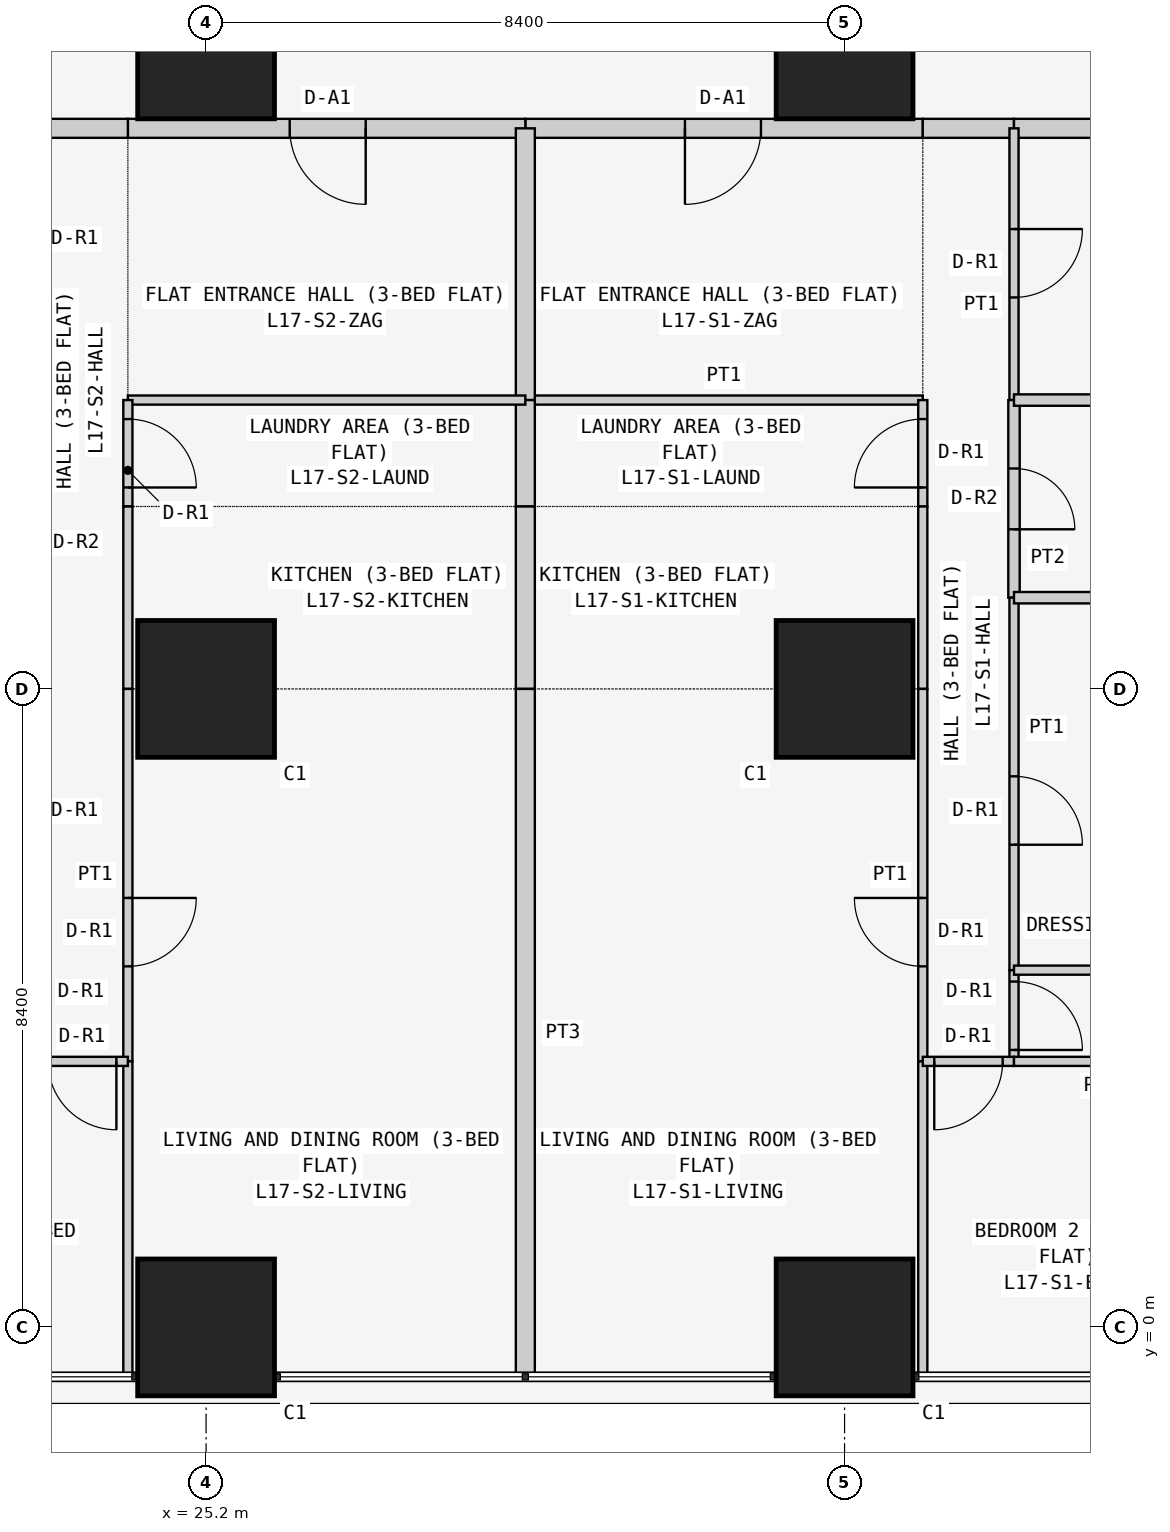
"""IFC4 building model, lengths in metres.
Left out: names, types, materials, properties, quantities, classifications, styles, units other than length and angle.
Written with IfcOpenShell. Run it as: python <this file> out.ifc"""

import sys

from ifc_helpers import new_model, si_unit, direction, frame, frame_2d, origin, origin_2d, place, context, subcontext, project, spatial, rectangle, extrude, element, fill, save


model = new_model("IFC4")
c1 = context("Model", 3, precision=1e-05, world=origin(), true_north=direction((0.0, 1.0)))
c2 = subcontext(c1, "Body", "Model", "MODEL_VIEW")
j1 = project(units=[si_unit("LENGTHUNIT", "METRE"), si_unit("PLANEANGLEUNIT", "RADIAN")], contexts=[c1])
p1 = place(None, origin())
s1 = spatial("IfcSite", under=j1, at=p1, CompositionType="ELEMENT")
p2 = place(p1, origin())
s2 = spatial("IfcBuilding", under=s1, at=p2, CompositionType="ELEMENT")
p3 = place(p2, frame((0.0, 0.0, 70.5)))
s3 = spatial("IfcBuildingStorey", under=s2, at=p3, CompositionType="ELEMENT", Elevation=70.5)
for number, where, z_axis, x_axis in (
    (1, (25.2, 0.0, 0.0), (0.0, 0.0, 1.0), (1.0, 0.0, 0.0)),
    (2, (25.2, 8.4, 0.0), (0.0, 0.0, 1.0), (1.0, 0.0, 0.0)),
    (3, (25.2, 16.8, 0.0), (0.0, 0.0, 1.0), (1.0, 0.0, 0.0)),
    (4, (33.6, 0.0, 0.0), (0.0, 0.0, 1.0), (1.0, 0.0, 0.0)),
    (5, (33.6, 8.4, 0.0), (0.0, 0.0, 1.0), (1.0, 0.0, 0.0)),
    (6, (33.6, 16.8, 0.0), (0.0, 0.0, 1.0), (1.0, 0.0, 0.0)),
):
    element("IfcColumn", number, at=place(p3, frame(where, z_axis=z_axis, x_axis=x_axis)), inside=s3, PredefinedType="COLUMN", context=c2, shape_type="SweptSolid", body=[
        extrude(rectangle(XDim=1.8, YDim=1.8, at=origin_2d()), origin(), (0.0, 0.0, 1.0), 3.6),
    ])
p4 = place(p3, frame((34.629, 15.775, 0.0), z_axis=(0.0, 0.0, 1.0), x_axis=(-1.0, 0.0, 0.0)))
e7 = element("IfcWall", 7, at=p4, inside=s3, PredefinedType="PARTITIONING", context=c2, shape_type="SweptSolid", body=[
    extrude(rectangle(XDim=5.229, YDim=0.25, at=frame_2d((2.615, 0.0))), origin(), (0.0, 0.0, 1.0), 3.45),
])
p5 = place(p4, frame((2.129, 0.0, 0.0)))
e8 = element("IfcOpeningElement", 8, at=p5, cuts=e7, PredefinedType="OPENING", context=c2, shape_type="SweptSolid", body=[
    extrude(rectangle(XDim=1.0, YDim=2.1, at=frame_2d((0.5, 1.05))), frame((0.0, 0.135, 0.0), z_axis=(0.0, -1.0, 0.0), x_axis=(1.0, 0.0, 0.0)), (0.0, 0.0, 1.0), 0.27),
])
p6 = place(p3, frame((35.829, 15.775, 0.0), z_axis=(0.0, 0.0, 1.0), x_axis=(-1.0, 0.0, 0.0)))
e9 = element("IfcWall", 9, at=p6, inside=s3, PredefinedType="PARTITIONING", context=c2, shape_type="SweptSolid", body=[
    extrude(rectangle(XDim=1.2, YDim=0.25, at=frame_2d((0.6, 0.0))), origin(), (0.0, 0.0, 1.0), 3.45),
])
p7 = place(p3, frame((42.7, 15.775, 0.0), z_axis=(0.0, 0.0, 1.0), x_axis=(-1.0, 0.0, 0.0)))
e10 = element("IfcWall", 10, at=p7, inside=s3, PredefinedType="PARTITIONING", context=c2, shape_type="SweptSolid", body=[
    extrude(rectangle(XDim=6.871, YDim=0.25, at=frame_2d((3.436, 0.0))), origin(), (0.0, 0.0, 1.0), 3.45),
])
p8 = place(p3, frame((29.4, 15.775, 0.0), z_axis=(0.0, 0.0, 1.0), x_axis=(-1.0, 0.0, 0.0)))
e11 = element("IfcWall", 11, at=p8, inside=s3, PredefinedType="PARTITIONING", context=c2, shape_type="SweptSolid", body=[
    extrude(rectangle(XDim=5.229, YDim=0.25, at=frame_2d((2.615, 0.0))), origin(), (0.0, 0.0, 1.0), 3.45),
])
p9 = place(p8, frame((2.1, 0.0, 0.0)))
e12 = element("IfcOpeningElement", 12, at=p9, cuts=e11, PredefinedType="OPENING", context=c2, shape_type="SweptSolid", body=[
    extrude(rectangle(XDim=1.0, YDim=2.1, at=frame_2d((0.5, 1.05))), frame((0.0, 0.135, 0.0), z_axis=(0.0, -1.0, 0.0), x_axis=(1.0, 0.0, 0.0)), (0.0, 0.0, 1.0), 0.27),
])
p10 = place(p3, frame((24.171, 15.775, 0.0), z_axis=(0.0, 0.0, 1.0), x_axis=(-1.0, 0.0, 0.0)))
e13 = element("IfcWall", 13, at=p10, inside=s3, PredefinedType="PARTITIONING", context=c2, shape_type="SweptSolid", body=[
    extrude(rectangle(XDim=1.2, YDim=0.25, at=frame_2d((0.6, 0.0))), origin(), (0.0, 0.0, 1.0), 3.45),
])
p11 = place(p3, frame((29.4, 12.2, 0.0), z_axis=(0.0, 0.0, 1.0), x_axis=(1.0, 0.0, 0.0)))
e14 = element("IfcWall", 14, at=p11, inside=s3, PredefinedType="PARTITIONING", context=c2, shape_type="SweptSolid", body=[
    extrude(rectangle(XDim=5.229, YDim=0.12, at=frame_2d((2.615, 0.0))), origin(), (0.0, 0.0, 1.0), 3.45),
])
p12 = place(p3, frame((29.4, 15.775, 0.0), z_axis=(0.0, 0.0, 1.0), x_axis=(0.0, -1.0, 0.0)))
e15 = element("IfcWall", 15, at=p12, inside=s3, PredefinedType="PARTITIONING", context=c2, shape_type="SweptSolid", body=[
    extrude(rectangle(XDim=3.575, YDim=0.25, at=frame_2d((1.788, 0.0))), origin(), (0.0, 0.0, 1.0), 2.848),
])
p13 = place(p3, frame((34.629, 10.8, 0.0), z_axis=(0.0, 0.0, 1.0), x_axis=(0.0, 1.0, 0.0)))
e16 = element("IfcWall", 16, at=p13, inside=s3, PredefinedType="PARTITIONING", context=c2, shape_type="SweptSolid", body=[
    extrude(rectangle(XDim=1.4, YDim=0.12, at=frame_2d((0.7, 0.0))), origin(), (0.0, 0.0, 1.0), 3.45),
])
p14 = place(p13, frame((0.25, 0.0, 0.0)))
e17 = element("IfcOpeningElement", 17, at=p14, cuts=e16, PredefinedType="OPENING", context=c2, shape_type="SweptSolid", body=[
    extrude(rectangle(XDim=0.9, YDim=2.1, at=frame_2d((0.45, 1.05))), frame((0.0, 0.07, 0.0), z_axis=(0.0, -1.0, 0.0), x_axis=(1.0, 0.0, 0.0)), (0.0, 0.0, 1.0), 0.14),
])
p15 = place(p3, frame((29.4, 12.2, 0.0), z_axis=(0.0, 0.0, 1.0), x_axis=(0.0, -1.0, 0.0)))
e18 = element("IfcWall", 18, at=p15, inside=s3, PredefinedType="PARTITIONING", context=c2, shape_type="SweptSolid", body=[
    extrude(rectangle(XDim=1.4, YDim=0.25, at=frame_2d((0.7, 0.0))), origin(), (0.0, 0.0, 1.0), 2.848),
])
p16 = place(p3, frame((34.629, 8.4, 0.0), z_axis=(0.0, 0.0, 1.0), x_axis=(0.0, 1.0, 0.0)))
e19 = element("IfcWall", 19, at=p16, inside=s3, PredefinedType="PARTITIONING", context=c2, shape_type="SweptSolid", body=[
    extrude(rectangle(XDim=2.4, YDim=0.12, at=frame_2d((1.2, 0.0))), origin(), (0.0, 0.0, 1.0), 3.45),
])
p17 = place(p3, frame((29.4, 10.8, 0.0), z_axis=(0.0, 0.0, 1.0), x_axis=(0.0, -1.0, 0.0)))
e20 = element("IfcWall", 20, at=p17, inside=s3, PredefinedType="PARTITIONING", context=c2, shape_type="SweptSolid", body=[
    extrude(rectangle(XDim=2.4, YDim=0.25, at=frame_2d((1.2, 0.0))), origin(), (0.0, 0.0, 1.0), 2.848),
])
p18 = place(p3, frame((34.629, 3.5, 0.0), z_axis=(0.0, 0.0, 1.0), x_axis=(0.0, 1.0, 0.0)))
e21 = element("IfcWall", 21, at=p18, inside=s3, PredefinedType="PARTITIONING", context=c2, shape_type="SweptSolid", body=[
    extrude(rectangle(XDim=4.9, YDim=0.12, at=frame_2d((2.45, 0.0))), origin(), (0.0, 0.0, 1.0), 3.45),
])
p19 = place(p18, frame((1.25, 0.0, 0.0)))
e22 = element("IfcOpeningElement", 22, at=p19, cuts=e21, PredefinedType="OPENING", context=c2, shape_type="SweptSolid", body=[
    extrude(rectangle(XDim=0.9, YDim=2.1, at=frame_2d((0.45, 1.05))), frame((0.0, 0.07, 0.0), z_axis=(0.0, -1.0, 0.0), x_axis=(1.0, 0.0, 0.0)), (0.0, 0.0, 1.0), 0.14),
])
p20 = place(p3, frame((34.629, -0.65, 0.0), z_axis=(0.0, 0.0, 1.0), x_axis=(0.0, 1.0, 0.0)))
e23 = element("IfcWall", 23, at=p20, inside=s3, PredefinedType="PARTITIONING", context=c2, shape_type="SweptSolid", body=[
    extrude(rectangle(XDim=4.15, YDim=0.12, at=frame_2d((2.075, 0.0))), origin(), (0.0, 0.0, 1.0), 3.45),
])
p21 = place(p3, frame((29.4, 8.4, 0.0), z_axis=(0.0, 0.0, 1.0), x_axis=(0.0, -1.0, 0.0)))
e24 = element("IfcWall", 24, at=p21, inside=s3, PredefinedType="PARTITIONING", context=c2, shape_type="SweptSolid", body=[
    extrude(rectangle(XDim=9.05, YDim=0.25, at=frame_2d((4.525, 0.0))), origin(), (0.0, 0.0, 1.0), 2.848),
])
p22 = place(p3, frame((35.829, 12.2, 0.0), z_axis=(0.0, 0.0, 1.0), x_axis=(0.0, 1.0, 0.0)))
e25 = element("IfcWall", 25, at=p22, inside=s3, PredefinedType="PARTITIONING", context=c2, shape_type="SweptSolid", body=[
    extrude(rectangle(XDim=3.575, YDim=0.12, at=frame_2d((1.788, 0.0))), origin(), (0.0, 0.0, 1.0), 3.45),
])
p23 = place(p22, frame((1.35, 0.0, 0.0)))
e26 = element("IfcOpeningElement", 26, at=p23, cuts=e25, PredefinedType="OPENING", context=c2, shape_type="SweptSolid", body=[
    extrude(rectangle(XDim=0.9, YDim=2.1, at=frame_2d((0.45, 1.05))), frame((0.0, 0.07, 0.0), z_axis=(0.0, -1.0, 0.0), x_axis=(1.0, 0.0, 0.0)), (0.0, 0.0, 1.0), 0.14),
])
p24 = place(p3, frame((35.829, 9.6, 0.0), z_axis=(0.0, 0.0, 1.0), x_axis=(0.0, 1.0, 0.0)))
e27 = element("IfcWall", 27, at=p24, inside=s3, PredefinedType="PARTITIONING", context=c2, shape_type="SweptSolid", body=[
    extrude(rectangle(XDim=2.6, YDim=0.15, at=frame_2d((1.3, 0.0))), origin(), (0.0, 0.0, 1.0), 3.45),
])
p25 = place(p24, frame((0.9, 0.0, 0.0)))
e28 = element("IfcOpeningElement", 28, at=p25, cuts=e27, PredefinedType="OPENING", context=c2, shape_type="SweptSolid", body=[
    extrude(rectangle(XDim=0.8, YDim=2.1, at=frame_2d((0.4, 1.05))), frame((0.0, 0.085, 0.0), z_axis=(0.0, -1.0, 0.0), x_axis=(1.0, 0.0, 0.0)), (0.0, 0.0, 1.0), 0.17),
])
p26 = place(p3, frame((35.829, 4.7, 0.0), z_axis=(0.0, 0.0, 1.0), x_axis=(0.0, 1.0, 0.0)))
e29 = element("IfcWall", 29, at=p26, inside=s3, PredefinedType="PARTITIONING", context=c2, shape_type="SweptSolid", body=[
    extrude(rectangle(XDim=4.9, YDim=0.12, at=frame_2d((2.45, 0.0))), origin(), (0.0, 0.0, 1.0), 3.45),
])
p27 = place(p26, frame((1.65, 0.0, 0.0)))
e30 = element("IfcOpeningElement", 30, at=p27, cuts=e29, PredefinedType="OPENING", context=c2, shape_type="SweptSolid", body=[
    extrude(rectangle(XDim=0.9, YDim=2.1, at=frame_2d((0.45, 1.05))), frame((0.0, 0.07, 0.0), z_axis=(0.0, -1.0, 0.0), x_axis=(1.0, 0.0, 0.0)), (0.0, 0.0, 1.0), 0.14),
])
p28 = place(p3, frame((35.829, 3.5, 0.0), z_axis=(0.0, 0.0, 1.0), x_axis=(0.0, 1.0, 0.0)))
e31 = element("IfcWall", 31, at=p28, inside=s3, PredefinedType="PARTITIONING", context=c2, shape_type="SweptSolid", body=[
    extrude(rectangle(XDim=1.2, YDim=0.12, at=frame_2d((0.6, 0.0))), origin(), (0.0, 0.0, 1.0), 3.45),
])
p29 = place(p28, frame((0.15, 0.0, 0.0)))
e32 = element("IfcOpeningElement", 32, at=p29, cuts=e31, PredefinedType="OPENING", context=c2, shape_type="SweptSolid", body=[
    extrude(rectangle(XDim=0.9, YDim=2.1, at=frame_2d((0.45, 1.05))), frame((0.0, 0.07, 0.0), z_axis=(0.0, -1.0, 0.0), x_axis=(1.0, 0.0, 0.0)), (0.0, 0.0, 1.0), 0.14),
])
p30 = place(p3, frame((34.629, 3.5, 0.0), z_axis=(0.0, 0.0, 1.0), x_axis=(1.0, 0.0, 0.0)))
e33 = element("IfcWall", 33, at=p30, inside=s3, PredefinedType="PARTITIONING", context=c2, shape_type="SweptSolid", body=[
    extrude(rectangle(XDim=1.2, YDim=0.12, at=frame_2d((0.6, 0.0))), origin(), (0.0, 0.0, 1.0), 3.45),
])
p31 = place(p30, frame((0.151, 0.0, 0.0)))
e34 = element("IfcOpeningElement", 34, at=p31, cuts=e33, PredefinedType="OPENING", context=c2, shape_type="SweptSolid", body=[
    extrude(rectangle(XDim=0.9, YDim=2.1, at=frame_2d((0.45, 1.05))), frame((0.0, 0.07, 0.0), z_axis=(0.0, -1.0, 0.0), x_axis=(1.0, 0.0, 0.0)), (0.0, 0.0, 1.0), 0.14),
])
for number, where, z_axis, x_axis in (
    (35, (35.829, 12.2, 0.0), (0.0, 0.0, 1.0), (1.0, 0.0, 0.0)),
    (36, (35.829, 9.6, 0.0), (0.0, 0.0, 1.0), (1.0, 0.0, 0.0)),
):
    element("IfcWall", number, at=place(p3, frame(where, z_axis=z_axis, x_axis=x_axis)), inside=s3, PredefinedType="PARTITIONING", context=c2, shape_type="SweptSolid", body=[
        extrude(rectangle(XDim=2.971, YDim=0.15, at=frame_2d((1.485, 0.0))), origin(), (0.0, 0.0, 1.0), 3.45),
    ])
for number, where, z_axis, x_axis in (
    (37, (35.829, 4.7, 0.0), (0.0, 0.0, 1.0), (1.0, 0.0, 0.0)),
    (38, (35.829, 3.5, 0.0), (0.0, 0.0, 1.0), (1.0, 0.0, 0.0)),
):
    element("IfcWall", number, at=place(p3, frame(where, z_axis=z_axis, x_axis=x_axis)), inside=s3, PredefinedType="PARTITIONING", context=c2, shape_type="SweptSolid", body=[
        extrude(rectangle(XDim=2.285, YDim=0.12, at=frame_2d((1.143, 0.0))), origin(), (0.0, 0.0, 1.0), 3.45),
    ])
p32 = place(p3, frame((29.4, 12.2, 0.0), z_axis=(0.0, 0.0, 1.0), x_axis=(-1.0, 0.0, 0.0)))
e39 = element("IfcWall", 39, at=p32, inside=s3, PredefinedType="PARTITIONING", context=c2, shape_type="SweptSolid", body=[
    extrude(rectangle(XDim=5.229, YDim=0.12, at=frame_2d((2.615, 0.0))), origin(), (0.0, 0.0, 1.0), 3.45),
])
p33 = place(p3, frame((24.171, 10.8, 0.0), z_axis=(0.0, 0.0, 1.0), x_axis=(0.0, 1.0, 0.0)))
e40 = element("IfcWall", 40, at=p33, inside=s3, PredefinedType="PARTITIONING", context=c2, shape_type="SweptSolid", body=[
    extrude(rectangle(XDim=1.4, YDim=0.12, at=frame_2d((0.7, 0.0))), origin(), (0.0, 0.0, 1.0), 3.45),
])
p34 = place(p33, frame((0.25, 0.0, 0.0)))
e41 = element("IfcOpeningElement", 41, at=p34, cuts=e40, PredefinedType="OPENING", context=c2, shape_type="SweptSolid", body=[
    extrude(rectangle(XDim=0.9, YDim=2.1, at=frame_2d((0.45, 1.05))), frame((0.0, 0.07, 0.0), z_axis=(0.0, -1.0, 0.0), x_axis=(1.0, 0.0, 0.0)), (0.0, 0.0, 1.0), 0.14),
])
p35 = place(p3, frame((24.171, 8.4, 0.0), z_axis=(0.0, 0.0, 1.0), x_axis=(0.0, 1.0, 0.0)))
e42 = element("IfcWall", 42, at=p35, inside=s3, PredefinedType="PARTITIONING", context=c2, shape_type="SweptSolid", body=[
    extrude(rectangle(XDim=2.4, YDim=0.12, at=frame_2d((1.2, 0.0))), origin(), (0.0, 0.0, 1.0), 3.45),
])
p36 = place(p3, frame((24.171, 3.5, 0.0), z_axis=(0.0, 0.0, 1.0), x_axis=(0.0, 1.0, 0.0)))
e43 = element("IfcWall", 43, at=p36, inside=s3, PredefinedType="PARTITIONING", context=c2, shape_type="SweptSolid", body=[
    extrude(rectangle(XDim=4.9, YDim=0.12, at=frame_2d((2.45, 0.0))), origin(), (0.0, 0.0, 1.0), 3.45),
])
p37 = place(p36, frame((1.25, 0.0, 0.0)))
e44 = element("IfcOpeningElement", 44, at=p37, cuts=e43, PredefinedType="OPENING", context=c2, shape_type="SweptSolid", body=[
    extrude(rectangle(XDim=0.9, YDim=2.1, at=frame_2d((0.45, 1.05))), frame((0.0, 0.07, 0.0), z_axis=(0.0, -1.0, 0.0), x_axis=(1.0, 0.0, 0.0)), (0.0, 0.0, 1.0), 0.14),
])
p38 = place(p3, frame((24.171, -0.65, 0.0), z_axis=(0.0, 0.0, 1.0), x_axis=(0.0, 1.0, 0.0)))
e45 = element("IfcWall", 45, at=p38, inside=s3, PredefinedType="PARTITIONING", context=c2, shape_type="SweptSolid", body=[
    extrude(rectangle(XDim=4.15, YDim=0.12, at=frame_2d((2.075, 0.0))), origin(), (0.0, 0.0, 1.0), 3.45),
])
p39 = place(p3, frame((24.171, 3.5, 0.0), z_axis=(0.0, 0.0, 1.0), x_axis=(-1.0, 0.0, 0.0)))
e46 = element("IfcWall", 46, at=p39, inside=s3, PredefinedType="PARTITIONING", context=c2, shape_type="SweptSolid", body=[
    extrude(rectangle(XDim=1.2, YDim=0.12, at=frame_2d((0.6, 0.0))), origin(), (0.0, 0.0, 1.0), 3.45),
])
p40 = place(p39, frame((0.151, 0.0, 0.0)))
e47 = element("IfcOpeningElement", 47, at=p40, cuts=e46, PredefinedType="OPENING", context=c2, shape_type="SweptSolid", body=[
    extrude(rectangle(XDim=0.9, YDim=2.1, at=frame_2d((0.45, 1.05))), frame((0.0, 0.07, 0.0), z_axis=(0.0, -1.0, 0.0), x_axis=(1.0, 0.0, 0.0)), (0.0, 0.0, 1.0), 0.14),
])
p41 = place(p5, origin())
e48 = element("IfcDoor", 48, at=p41, inside=s3, OperationType="SINGLE_SWING_RIGHT", PredefinedType="DOOR", context=c2, shape_type="SweptSolid", body=[
    extrude(rectangle(XDim=1.0, YDim=2.1, at=frame_2d((0.5, 1.05))), frame((0.0, 0.025, 0.0), z_axis=(0.0, -1.0, 0.0), x_axis=(1.0, 0.0, 0.0)), (0.0, 0.0, 1.0), 0.05),
])
fill(e8, e48)
p42 = place(p14, origin())
e49 = element("IfcDoor", 49, at=p42, inside=s3, OperationType="SINGLE_SWING_LEFT", PredefinedType="DOOR", context=c2, shape_type="SweptSolid", body=[
    extrude(rectangle(XDim=0.9, YDim=2.1, at=frame_2d((0.45, 1.05))), frame((0.0, 0.025, 0.0), z_axis=(0.0, -1.0, 0.0), x_axis=(1.0, 0.0, 0.0)), (0.0, 0.0, 1.0), 0.05),
])
fill(e17, e49)
p43 = place(p19, origin())
e50 = element("IfcDoor", 50, at=p43, inside=s3, OperationType="SINGLE_SWING_RIGHT", PredefinedType="DOOR", context=c2, shape_type="SweptSolid", body=[
    extrude(rectangle(XDim=0.9, YDim=2.1, at=frame_2d((0.45, 1.05))), frame((0.0, 0.025, 0.0), z_axis=(0.0, -1.0, 0.0), x_axis=(1.0, 0.0, 0.0)), (0.0, 0.0, 1.0), 0.05),
])
fill(e22, e50)
p44 = place(p23, frame((0.9, 0.0, 0.0), z_axis=(0.0, 0.0, 1.0), x_axis=(-1.0, 0.0, 0.0)))
e51 = element("IfcDoor", 51, at=p44, inside=s3, OperationType="SINGLE_SWING_LEFT", PredefinedType="DOOR", context=c2, shape_type="SweptSolid", body=[
    extrude(rectangle(XDim=0.9, YDim=2.1, at=frame_2d((0.45, 1.05))), frame((0.0, 0.025, 0.0), z_axis=(0.0, -1.0, 0.0), x_axis=(1.0, 0.0, 0.0)), (0.0, 0.0, 1.0), 0.05),
])
fill(e26, e51)
p45 = place(p25, frame((0.8, 0.0, 0.0), z_axis=(0.0, 0.0, 1.0), x_axis=(-1.0, 0.0, 0.0)))
e52 = element("IfcDoor", 52, at=p45, inside=s3, OperationType="SINGLE_SWING_RIGHT", PredefinedType="DOOR", context=c2, shape_type="SweptSolid", body=[
    extrude(rectangle(XDim=0.8, YDim=2.1, at=frame_2d((0.4, 1.05))), frame((0.0, 0.025, 0.0), z_axis=(0.0, -1.0, 0.0), x_axis=(1.0, 0.0, 0.0)), (0.0, 0.0, 1.0), 0.05),
])
fill(e28, e52)
p46 = place(p27, frame((0.9, 0.0, 0.0), z_axis=(0.0, 0.0, 1.0), x_axis=(-1.0, 0.0, 0.0)))
e53 = element("IfcDoor", 53, at=p46, inside=s3, OperationType="SINGLE_SWING_RIGHT", PredefinedType="DOOR", context=c2, shape_type="SweptSolid", body=[
    extrude(rectangle(XDim=0.9, YDim=2.1, at=frame_2d((0.45, 1.05))), frame((0.0, 0.025, 0.0), z_axis=(0.0, -1.0, 0.0), x_axis=(1.0, 0.0, 0.0)), (0.0, 0.0, 1.0), 0.05),
])
fill(e30, e53)
p47 = place(p29, frame((0.9, 0.0, 0.0), z_axis=(0.0, 0.0, 1.0), x_axis=(-1.0, 0.0, 0.0)))
e54 = element("IfcDoor", 54, at=p47, inside=s3, OperationType="SINGLE_SWING_RIGHT", PredefinedType="DOOR", context=c2, shape_type="SweptSolid", body=[
    extrude(rectangle(XDim=0.9, YDim=2.1, at=frame_2d((0.45, 1.05))), frame((0.0, 0.025, 0.0), z_axis=(0.0, -1.0, 0.0), x_axis=(1.0, 0.0, 0.0)), (0.0, 0.0, 1.0), 0.05),
])
fill(e32, e54)
p48 = place(p31, frame((0.9, 0.0, 0.0), z_axis=(0.0, 0.0, 1.0), x_axis=(-1.0, 0.0, 0.0)))
e55 = element("IfcDoor", 55, at=p48, inside=s3, OperationType="SINGLE_SWING_RIGHT", PredefinedType="DOOR", context=c2, shape_type="SweptSolid", body=[
    extrude(rectangle(XDim=0.9, YDim=2.1, at=frame_2d((0.45, 1.05))), frame((0.0, 0.025, 0.0), z_axis=(0.0, -1.0, 0.0), x_axis=(1.0, 0.0, 0.0)), (0.0, 0.0, 1.0), 0.05),
])
fill(e34, e55)
p49 = place(p9, origin())
e56 = element("IfcDoor", 56, at=p49, inside=s3, OperationType="SINGLE_SWING_LEFT", PredefinedType="DOOR", context=c2, shape_type="SweptSolid", body=[
    extrude(rectangle(XDim=1.0, YDim=2.1, at=frame_2d((0.5, 1.05))), frame((0.0, 0.025, 0.0), z_axis=(0.0, -1.0, 0.0), x_axis=(1.0, 0.0, 0.0)), (0.0, 0.0, 1.0), 0.05),
])
fill(e12, e56)
p50 = place(p34, frame((0.9, 0.0, 0.0), z_axis=(0.0, 0.0, 1.0), x_axis=(-1.0, 0.0, 0.0)))
e57 = element("IfcDoor", 57, at=p50, inside=s3, OperationType="SINGLE_SWING_RIGHT", PredefinedType="DOOR", context=c2, shape_type="SweptSolid", body=[
    extrude(rectangle(XDim=0.9, YDim=2.1, at=frame_2d((0.45, 1.05))), frame((0.0, 0.025, 0.0), z_axis=(0.0, -1.0, 0.0), x_axis=(1.0, 0.0, 0.0)), (0.0, 0.0, 1.0), 0.05),
])
fill(e41, e57)
p51 = place(p37, frame((0.9, 0.0, 0.0), z_axis=(0.0, 0.0, 1.0), x_axis=(-1.0, 0.0, 0.0)))
e58 = element("IfcDoor", 58, at=p51, inside=s3, OperationType="SINGLE_SWING_LEFT", PredefinedType="DOOR", context=c2, shape_type="SweptSolid", body=[
    extrude(rectangle(XDim=0.9, YDim=2.1, at=frame_2d((0.45, 1.05))), frame((0.0, 0.025, 0.0), z_axis=(0.0, -1.0, 0.0), x_axis=(1.0, 0.0, 0.0)), (0.0, 0.0, 1.0), 0.05),
])
fill(e44, e58)
p52 = place(p40, origin())
e59 = element("IfcDoor", 59, at=p52, inside=s3, OperationType="SINGLE_SWING_LEFT", PredefinedType="DOOR", context=c2, shape_type="SweptSolid", body=[
    extrude(rectangle(XDim=0.9, YDim=2.1, at=frame_2d((0.45, 1.05))), frame((0.0, 0.025, 0.0), z_axis=(0.0, -1.0, 0.0), x_axis=(1.0, 0.0, 0.0)), (0.0, 0.0, 1.0), 0.05),
])
fill(e47, e59)
save(model, sys.argv[1])
